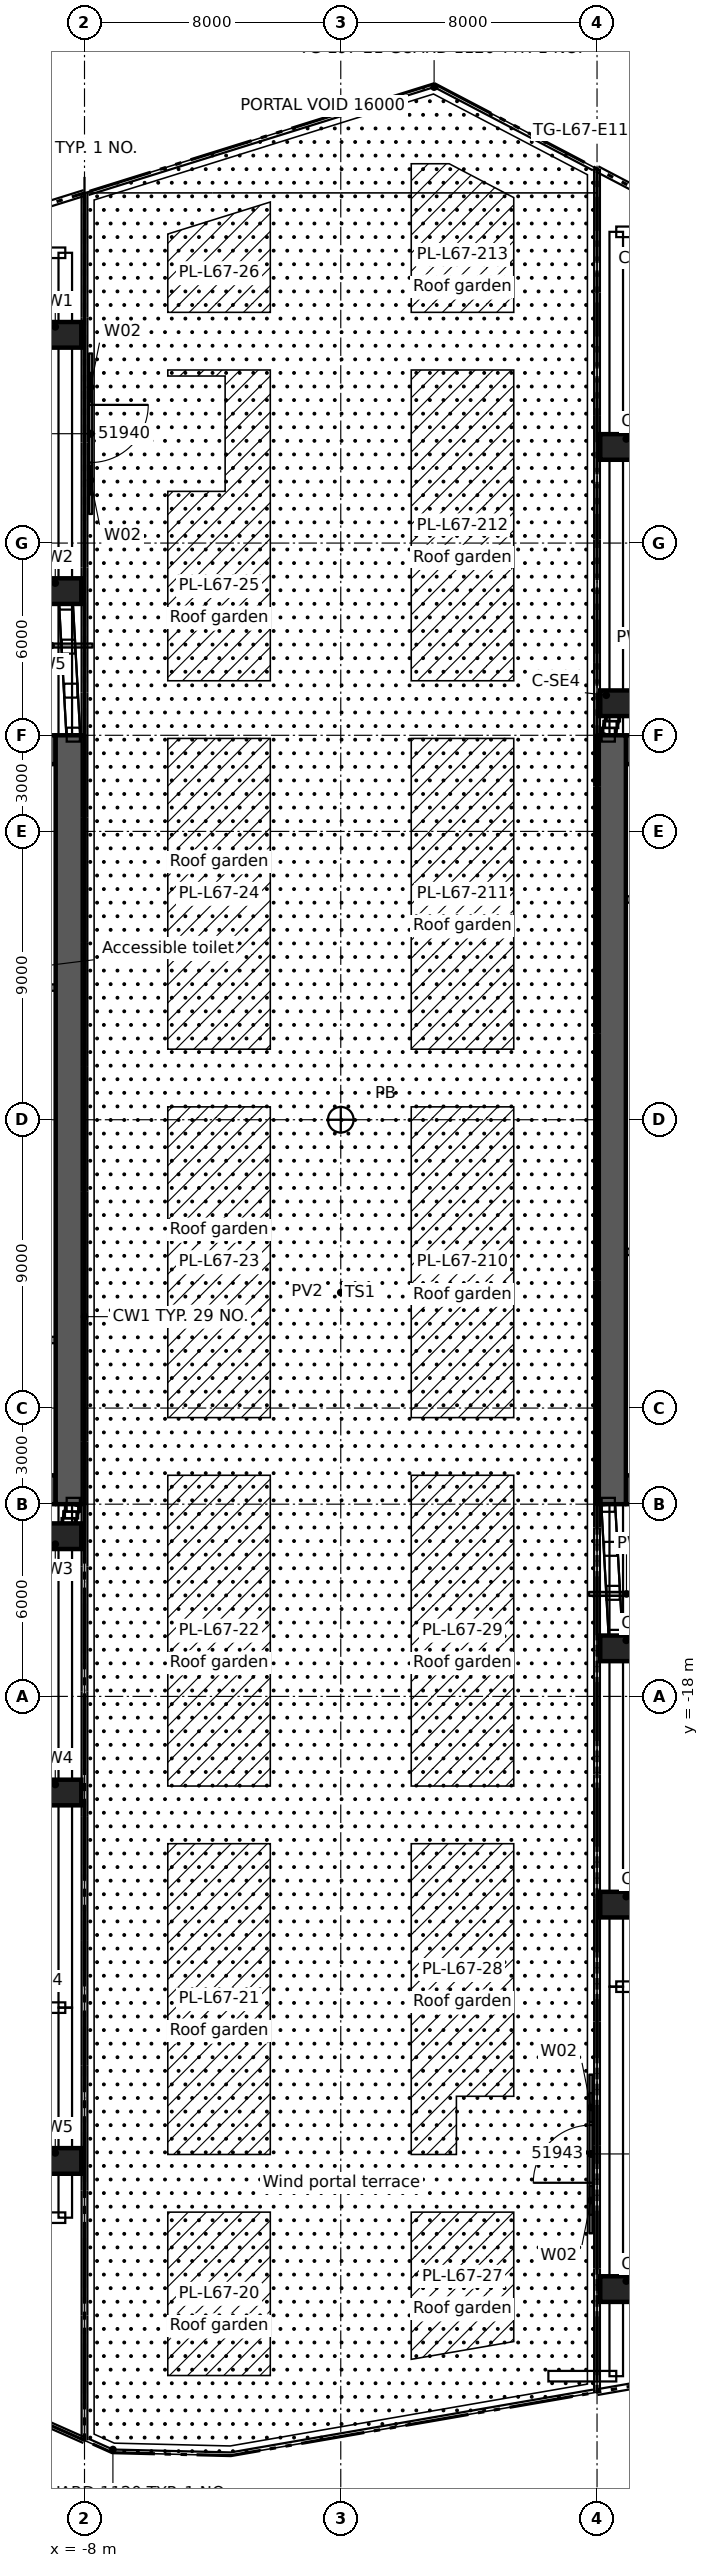
"""IFC4 building model, lengths in metres.
Left out: names, types, materials, properties, quantities, classifications, styles, units other than length and angle.
Written with IfcOpenShell. Run it as: python <this file> out.ifc"""

import sys

from ifc_helpers import new_model, si_unit, direction, frame, frame_2d, origin, origin_2d, place, context, subcontext, project, spatial, rectangle, extrude, element, fill, save


model = new_model("IFC4")
c1 = context("Model", 3, precision=1e-05, world=origin(), true_north=direction((0.0, 1.0)))
c2 = subcontext(c1, "Body", "Model", "MODEL_VIEW")
j1 = project(units=[si_unit("LENGTHUNIT", "METRE"), si_unit("PLANEANGLEUNIT", "RADIAN")], contexts=[c1])
p1 = place(None, origin())
s1 = spatial("IfcSite", under=j1, at=p1, CompositionType="ELEMENT")
p2 = place(p1, origin())
s2 = spatial("IfcBuilding", under=s1, at=p2, CompositionType="ELEMENT")
p3 = place(p2, frame((0.0, 0.0, 253.5)))
s3 = spatial("IfcBuildingStorey", under=s2, at=p3, CompositionType="ELEMENT", Elevation=253.5)
p4 = place(p3, frame((-18.1, 11.55, 0.0), z_axis=(0.0, 0.0, 1.0), x_axis=(1.0, 0.0, 0.0)))
e1 = element("IfcWall", 1, at=p4, inside=s3, PredefinedType="SHEAR", context=c2, shape_type="SweptSolid", body=[
    extrude(rectangle(XDim=9.2, YDim=0.9, at=frame_2d((4.6, 0.0))), origin(), (0.0, 0.0, 1.0), 3.5),
])
p5 = place(p4, frame((7.25, 0.0, 0.0)))
e2 = element("IfcOpeningElement", 2, at=p5, cuts=e1, PredefinedType="OPENING", context=c2, shape_type="SweptSolid", body=[
    extrude(rectangle(XDim=1.1, YDim=2.1, at=frame_2d((0.55, 1.05))), frame((0.0, 0.46, 0.0), z_axis=(0.0, -1.0, 0.0), x_axis=(1.0, 0.0, 0.0)), (0.0, 0.0, 1.0), 0.92),
])
p6 = place(p4, frame((5.1, 0.0, 0.0)))
e3 = element("IfcOpeningElement", 3, at=p6, cuts=e1, PredefinedType="OPENING", context=c2, shape_type="SweptSolid", body=[
    extrude(rectangle(XDim=1.1, YDim=2.1, at=frame_2d((0.55, 1.05))), frame((0.0, 0.46, 0.0), z_axis=(0.0, -1.0, 0.0), x_axis=(1.0, 0.0, 0.0)), (0.0, 0.0, 1.0), 0.92),
])
p7 = place(p3, frame((-18.1, -11.55, 0.0), z_axis=(0.0, 0.0, 1.0), x_axis=(1.0, 0.0, 0.0)))
e4 = element("IfcWall", 4, at=p7, inside=s3, PredefinedType="SHEAR", context=c2, shape_type="SweptSolid", body=[
    extrude(rectangle(XDim=9.2, YDim=0.9, at=frame_2d((4.6, 0.0))), origin(), (0.0, 0.0, 1.0), 3.5),
])
p8 = place(p7, frame((6.9, 0.0, 0.0)))
e5 = element("IfcOpeningElement", 5, at=p8, cuts=e4, PredefinedType="OPENING", context=c2, shape_type="SweptSolid", body=[
    extrude(rectangle(XDim=1.8, YDim=2.1, at=frame_2d((0.9, 1.05))), frame((0.0, 0.46, 0.0), z_axis=(0.0, -1.0, 0.0), x_axis=(1.0, 0.0, 0.0)), (0.0, 0.0, 1.0), 0.92),
])
p9 = place(p7, frame((5.1, 0.0, 0.0)))
e6 = element("IfcOpeningElement", 6, at=p9, cuts=e4, PredefinedType="OPENING", context=c2, shape_type="SweptSolid", body=[
    extrude(rectangle(XDim=1.1, YDim=2.1, at=frame_2d((0.55, 1.05))), frame((0.0, 0.46, 0.0), z_axis=(0.0, -1.0, 0.0), x_axis=(1.0, 0.0, 0.0)), (0.0, 0.0, 1.0), 0.92),
])
p10 = place(p3, frame((-8.45, -12.0, 0.0), z_axis=(0.0, 0.0, 1.0), x_axis=(0.0, 1.0, 0.0)))
e7 = element("IfcWall", 7, at=p10, inside=s3, PredefinedType="SHEAR", context=c2, shape_type="SweptSolid", body=[
    extrude(rectangle(XDim=24.0, YDim=0.9, at=frame_2d((12.0, 0.0))), origin(), (0.0, 0.0, 1.0), 3.5),
])
p11 = place(p3, frame((8.9, 11.55, 0.0), z_axis=(0.0, 0.0, 1.0), x_axis=(1.0, 0.0, 0.0)))
e8 = element("IfcWall", 8, at=p11, inside=s3, PredefinedType="SHEAR", context=c2, shape_type="SweptSolid", body=[
    extrude(rectangle(XDim=9.2, YDim=0.9, at=frame_2d((4.6, 0.0))), origin(), (0.0, 0.0, 1.0), 3.5),
])
p12 = place(p11, frame((0.5, 0.0, 0.0)))
e9 = element("IfcOpeningElement", 9, at=p12, cuts=e8, PredefinedType="OPENING", context=c2, shape_type="SweptSolid", body=[
    extrude(rectangle(XDim=1.8, YDim=2.1, at=frame_2d((0.9, 1.05))), frame((0.0, 0.46, 0.0), z_axis=(0.0, -1.0, 0.0), x_axis=(1.0, 0.0, 0.0)), (0.0, 0.0, 1.0), 0.92),
])
p13 = place(p11, frame((3.0, 0.0, 0.0)))
e10 = element("IfcOpeningElement", 10, at=p13, cuts=e8, PredefinedType="OPENING", context=c2, shape_type="SweptSolid", body=[
    extrude(rectangle(XDim=1.1, YDim=2.1, at=frame_2d((0.55, 1.05))), frame((0.0, 0.46, 0.0), z_axis=(0.0, -1.0, 0.0), x_axis=(1.0, 0.0, 0.0)), (0.0, 0.0, 1.0), 0.92),
])
p14 = place(p3, frame((8.9, -11.55, 0.0), z_axis=(0.0, 0.0, 1.0), x_axis=(1.0, 0.0, 0.0)))
e11 = element("IfcWall", 11, at=p14, inside=s3, PredefinedType="SHEAR", context=c2, shape_type="SweptSolid", body=[
    extrude(rectangle(XDim=9.2, YDim=0.9, at=frame_2d((4.6, 0.0))), origin(), (0.0, 0.0, 1.0), 3.5),
])
p15 = place(p14, frame((0.85, 0.0, 0.0)))
e12 = element("IfcOpeningElement", 12, at=p15, cuts=e11, PredefinedType="OPENING", context=c2, shape_type="SweptSolid", body=[
    extrude(rectangle(XDim=1.1, YDim=2.1, at=frame_2d((0.55, 1.05))), frame((0.0, 0.46, 0.0), z_axis=(0.0, -1.0, 0.0), x_axis=(1.0, 0.0, 0.0)), (0.0, 0.0, 1.0), 0.92),
])
p16 = place(p14, frame((3.0, 0.0, 0.0)))
e13 = element("IfcOpeningElement", 13, at=p16, cuts=e11, PredefinedType="OPENING", context=c2, shape_type="SweptSolid", body=[
    extrude(rectangle(XDim=1.1, YDim=2.1, at=frame_2d((0.55, 1.05))), frame((0.0, 0.46, 0.0), z_axis=(0.0, -1.0, 0.0), x_axis=(1.0, 0.0, 0.0)), (0.0, 0.0, 1.0), 0.92),
])
p17 = place(p3, frame((8.45, -12.0, 0.0), z_axis=(0.0, 0.0, 1.0), x_axis=(0.0, 1.0, 0.0)))
e14 = element("IfcWall", 14, at=p17, inside=s3, PredefinedType="SHEAR", context=c2, shape_type="SweptSolid", body=[
    extrude(rectangle(XDim=24.0, YDim=0.9, at=frame_2d((12.0, 0.0))), origin(), (0.0, 0.0, 1.0), 3.5),
])
for number, where, z_axis, x_axis in (
    (15, (8.6, -36.5, 0.0), (0.0, 0.0, 1.0), (1.0, 0.0, 0.0)),
    (16, (8.6, -24.5, 0.0), (0.0, 0.0, 1.0), (1.0, 0.0, 0.0)),
    (17, (8.6, -16.5, 0.0), (0.0, 0.0, 1.0), (1.0, 0.0, 0.0)),
    (18, (8.6, 13.0, 0.0), (0.0, 0.0, 1.0), (1.0, 0.0, 0.0)),
    (19, (8.6, 21.0, 0.0), (0.0, 0.0, 1.0), (1.0, 0.0, 0.0)),
    (20, (-8.6, 24.5, 0.0), (0.0, 0.0, 1.0), (1.0, 0.0, 0.0)),
    (21, (-8.6, 16.5, 0.0), (0.0, 0.0, 1.0), (1.0, 0.0, 0.0)),
    (22, (-8.6, -13.0, 0.0), (0.0, 0.0, 1.0), (1.0, 0.0, 0.0)),
    (23, (-8.6, -21.0, 0.0), (0.0, 0.0, 1.0), (1.0, 0.0, 0.0)),
    (24, (-8.6, -32.5, 0.0), (0.0, 0.0, 1.0), (1.0, 0.0, 0.0)),
):
    element("IfcColumn", number, at=place(p3, frame(where, z_axis=z_axis, x_axis=x_axis)), inside=s3, PredefinedType="COLUMN", context=c2, shape_type="SweptSolid", body=[
        extrude(rectangle(XDim=1.0, YDim=0.8, at=origin_2d()), origin(), (0.0, 0.0, 1.0), 3.5),
    ])
p18 = place(p2, frame((0.0, 0.0, 271.0)))
s4 = spatial("IfcBuildingStorey", under=s2, at=p18, CompositionType="ELEMENT", Elevation=271.0)
for number, where, z_axis, x_axis in (
    (25, (-8.6, 30.43, -21.5), (0.0, 0.0, 1.0), (1.0, 0.0, 0.0)),
    (26, (8.6, 31.179, -21.5), (0.0, 0.0, 1.0), (1.0, 0.0, 0.0)),
    (27, (-8.6, -42.723, -21.5), (0.0, 0.0, 1.0), (1.0, 0.0, 0.0)),
    (28, (8.6, -41.217, -21.5), (0.0, 0.0, 1.0), (1.0, 0.0, 0.0)),
):
    element("IfcColumn", number, at=place(p18, frame(where, z_axis=z_axis, x_axis=x_axis)), inside=s4, PredefinedType="COLUMN", context=c2, shape_type="SweptSolid", body=[
        extrude(rectangle(XDim=1.2, YDim=1.2, at=origin_2d()), origin(), (0.0, 0.0, 1.0), 25.5),
    ])
p19 = place(p3, frame((-8.9, 4.125, 0.0), z_axis=(0.0, 0.0, 1.0), x_axis=(-1.0, 0.0, 0.0)))
e29 = element("IfcWall", 29, at=p19, inside=s3, PredefinedType="PARTITIONING", context=c2, shape_type="SweptSolid", body=[
    extrude(rectangle(XDim=2.44, YDim=0.2, at=frame_2d((1.22, 0.0))), origin(), (0.0, 0.0, 1.0), 3.09),
])
p20 = place(p19, frame((0.67, 0.0, 0.0)))
e30 = element("IfcOpeningElement", 30, at=p20, cuts=e29, PredefinedType="OPENING", context=c2, shape_type="SweptSolid", body=[
    extrude(rectangle(XDim=1.1, YDim=2.1, at=frame_2d((0.55, 1.05))), frame((0.0, 0.11, 0.0), z_axis=(0.0, -1.0, 0.0), x_axis=(1.0, 0.0, 0.0)), (0.0, 0.0, 1.0), 0.22),
])
p21 = place(p3, frame((-8.9, -6.875, 0.0), z_axis=(0.0, 0.0, 1.0), x_axis=(-1.0, 0.0, 0.0)))
e31 = element("IfcWall", 31, at=p21, inside=s3, PredefinedType="PARTITIONING", context=c2, shape_type="SweptSolid", body=[
    extrude(rectangle(XDim=2.44, YDim=0.2, at=frame_2d((1.22, 0.0))), origin(), (0.0, 0.0, 1.0), 3.09),
])
p22 = place(p21, frame((0.35, 0.0, 0.0)))
e32 = element("IfcOpeningElement", 32, at=p22, cuts=e31, PredefinedType="OPENING", context=c2, shape_type="SweptSolid", body=[
    extrude(rectangle(XDim=1.8, YDim=2.1, at=frame_2d((0.9, 1.05))), frame((0.0, 0.11, 0.0), z_axis=(0.0, -1.0, 0.0), x_axis=(1.0, 0.0, 0.0)), (0.0, 0.0, 1.0), 0.22),
])
p23 = place(p3, frame((8.9, -4.125, 0.0), z_axis=(0.0, 0.0, 1.0), x_axis=(1.0, 0.0, 0.0)))
e33 = element("IfcWall", 33, at=p23, inside=s3, PredefinedType="PARTITIONING", context=c2, shape_type="SweptSolid", body=[
    extrude(rectangle(XDim=2.44, YDim=0.2, at=frame_2d((1.22, 0.0))), origin(), (0.0, 0.0, 1.0), 3.09),
])
p24 = place(p23, frame((0.67, 0.0, 0.0)))
e34 = element("IfcOpeningElement", 34, at=p24, cuts=e33, PredefinedType="OPENING", context=c2, shape_type="SweptSolid", body=[
    extrude(rectangle(XDim=1.1, YDim=2.1, at=frame_2d((0.55, 1.05))), frame((0.0, 0.11, 0.0), z_axis=(0.0, -1.0, 0.0), x_axis=(1.0, 0.0, 0.0)), (0.0, 0.0, 1.0), 0.22),
])
p25 = place(p3, frame((8.9, 6.875, 0.0), z_axis=(0.0, 0.0, 1.0), x_axis=(1.0, 0.0, 0.0)))
e35 = element("IfcWall", 35, at=p25, inside=s3, PredefinedType="PARTITIONING", context=c2, shape_type="SweptSolid", body=[
    extrude(rectangle(XDim=2.44, YDim=0.2, at=frame_2d((1.22, 0.0))), origin(), (0.0, 0.0, 1.0), 3.09),
])
p26 = place(p25, frame((0.35, 0.0, 0.0)))
e36 = element("IfcOpeningElement", 36, at=p26, cuts=e35, PredefinedType="OPENING", context=c2, shape_type="SweptSolid", body=[
    extrude(rectangle(XDim=1.8, YDim=2.1, at=frame_2d((0.9, 1.05))), frame((0.0, 0.11, 0.0), z_axis=(0.0, -1.0, 0.0), x_axis=(1.0, 0.0, 0.0)), (0.0, 0.0, 1.0), 0.22),
])
p27 = place(p3, frame((-7.81, 23.919, 0.0), z_axis=(0.0, 0.0, 1.0), x_axis=(0.0, -1.0, 0.0)))
e37 = element("IfcWall", 37, at=p27, inside=s3, PredefinedType="STANDARD", context=c2, shape_type="SweptSolid", body=[
    extrude(rectangle(XDim=5.011, YDim=0.1, at=frame_2d((2.505, 0.0))), origin(), (0.0, 0.0, 1.0), 3.1),
])
p28 = place(p27, frame((1.605, 0.0, 0.0)))
e38 = element("IfcOpeningElement", 38, at=p28, cuts=e37, PredefinedType="OPENING", context=c2, shape_type="SweptSolid", body=[
    extrude(rectangle(XDim=1.8, YDim=2.4, at=frame_2d((0.9, 1.2))), frame((0.0, 0.06, 0.0), z_axis=(0.0, -1.0, 0.0), x_axis=(1.0, 0.0, 0.0)), (0.0, 0.0, 1.0), 0.12),
])
p29 = place(p27, frame((0.605, 0.0, 0.0)))
e39 = element("IfcOpeningElement", 39, at=p29, cuts=e37, PredefinedType="OPENING", context=c2, shape_type="SweptSolid", body=[
    extrude(rectangle(XDim=0.9, YDim=2.4, at=frame_2d((0.45, 1.2))), frame((0.0, 0.06, 0.0), z_axis=(0.0, -1.0, 0.0), x_axis=(1.0, 0.0, 0.0)), (0.0, 0.0, 1.0), 0.12),
])
p30 = place(p27, frame((3.505, 0.0, 0.0)))
e40 = element("IfcOpeningElement", 40, at=p30, cuts=e37, PredefinedType="OPENING", context=c2, shape_type="SweptSolid", body=[
    extrude(rectangle(XDim=0.9, YDim=2.4, at=frame_2d((0.45, 1.2))), frame((0.0, 0.06, 0.0), z_axis=(0.0, -1.0, 0.0), x_axis=(1.0, 0.0, 0.0)), (0.0, 0.0, 1.0), 0.12),
])
p31 = place(p3, frame((7.81, -34.76, 0.0), z_axis=(0.0, 0.0, 1.0), x_axis=(0.0, 1.0, 0.0)))
e41 = element("IfcWall", 41, at=p31, inside=s3, PredefinedType="STANDARD", context=c2, shape_type="SweptSolid", body=[
    extrude(rectangle(XDim=4.957, YDim=0.1, at=frame_2d((2.479, 0.0))), origin(), (0.0, 0.0, 1.0), 3.1),
])
p32 = place(p31, frame((1.578, 0.0, 0.0)))
e42 = element("IfcOpeningElement", 42, at=p32, cuts=e41, PredefinedType="OPENING", context=c2, shape_type="SweptSolid", body=[
    extrude(rectangle(XDim=1.8, YDim=2.4, at=frame_2d((0.9, 1.2))), frame((0.0, 0.06, 0.0), z_axis=(0.0, -1.0, 0.0), x_axis=(1.0, 0.0, 0.0)), (0.0, 0.0, 1.0), 0.12),
])
p33 = place(p31, frame((0.578, 0.0, 0.0)))
e43 = element("IfcOpeningElement", 43, at=p33, cuts=e41, PredefinedType="OPENING", context=c2, shape_type="SweptSolid", body=[
    extrude(rectangle(XDim=0.9, YDim=2.4, at=frame_2d((0.45, 1.2))), frame((0.0, 0.06, 0.0), z_axis=(0.0, -1.0, 0.0), x_axis=(1.0, 0.0, 0.0)), (0.0, 0.0, 1.0), 0.12),
])
p34 = place(p31, frame((3.479, 0.0, 0.0)))
e44 = element("IfcOpeningElement", 44, at=p34, cuts=e41, PredefinedType="OPENING", context=c2, shape_type="SweptSolid", body=[
    extrude(rectangle(XDim=0.9, YDim=2.4, at=frame_2d((0.45, 1.2))), frame((0.0, 0.06, 0.0), z_axis=(0.0, -1.0, 0.0), x_axis=(1.0, 0.0, 0.0)), (0.0, 0.0, 1.0), 0.12),
])
p35 = place(p3, frame((7.75, -14.801, 0.0), z_axis=(0.0, 0.0, 1.0), x_axis=(1.0, 0.0, 0.0)))
e45 = element("IfcWall", 45, at=p35, inside=s3, PredefinedType="PARTITIONING", context=c2, shape_type="SweptSolid", body=[
    extrude(rectangle(XDim=2.338, YDim=0.125, at=frame_2d((1.169, 0.0))), origin(), (0.0, 0.0, 1.0), 2.496),
])
p36 = place(p3, frame((-10.336, 14.801, 0.0), z_axis=(0.0, 0.0, 1.0), x_axis=(1.0, 0.0, 0.0)))
e46 = element("IfcWall", 46, at=p36, inside=s3, PredefinedType="PARTITIONING", context=c2, shape_type="SweptSolid", body=[
    extrude(rectangle(XDim=2.586, YDim=0.125, at=frame_2d((1.293, 0.0))), origin(), (0.0, 0.0, 1.0), 2.496),
])
p37 = place(p28, origin())
e47 = element("IfcDoor", 47, at=p37, inside=s3, OperationType="DOUBLE_DOOR_SINGLE_SWING", PredefinedType="DOOR", context=c2, shape_type="SweptSolid", body=[
    extrude(rectangle(XDim=1.8, YDim=2.4, at=frame_2d((0.9, 1.2))), frame((0.0, 0.025, 0.0), z_axis=(0.0, -1.0, 0.0), x_axis=(1.0, 0.0, 0.0)), (0.0, 0.0, 1.0), 0.05),
])
fill(e38, e47)
p38 = place(p29, origin())
e48 = element("IfcWindow", 48, at=p38, inside=s3, PartitioningType="SINGLE_PANEL", PredefinedType="WINDOW", context=c2, shape_type="SweptSolid", body=[
    extrude(rectangle(XDim=0.9, YDim=2.4, at=frame_2d((0.45, 1.2))), frame((0.0, 0.03, 0.0), z_axis=(0.0, -1.0, 0.0), x_axis=(1.0, 0.0, 0.0)), (0.0, 0.0, 1.0), 0.06),
])
fill(e39, e48)
p39 = place(p30, origin())
e49 = element("IfcWindow", 49, at=p39, inside=s3, PartitioningType="SINGLE_PANEL", PredefinedType="WINDOW", context=c2, shape_type="SweptSolid", body=[
    extrude(rectangle(XDim=0.9, YDim=2.4, at=frame_2d((0.45, 1.2))), frame((0.0, 0.03, 0.0), z_axis=(0.0, -1.0, 0.0), x_axis=(1.0, 0.0, 0.0)), (0.0, 0.0, 1.0), 0.06),
])
fill(e40, e49)
p40 = place(p32, origin())
e50 = element("IfcDoor", 50, at=p40, inside=s3, OperationType="DOUBLE_DOOR_SINGLE_SWING", PredefinedType="DOOR", context=c2, shape_type="SweptSolid", body=[
    extrude(rectangle(XDim=1.8, YDim=2.4, at=frame_2d((0.9, 1.2))), frame((0.0, 0.025, 0.0), z_axis=(0.0, -1.0, 0.0), x_axis=(1.0, 0.0, 0.0)), (0.0, 0.0, 1.0), 0.05),
])
fill(e42, e50)
p41 = place(p33, origin())
e51 = element("IfcWindow", 51, at=p41, inside=s3, PartitioningType="SINGLE_PANEL", PredefinedType="WINDOW", context=c2, shape_type="SweptSolid", body=[
    extrude(rectangle(XDim=0.9, YDim=2.4, at=frame_2d((0.45, 1.2))), frame((0.0, 0.03, 0.0), z_axis=(0.0, -1.0, 0.0), x_axis=(1.0, 0.0, 0.0)), (0.0, 0.0, 1.0), 0.06),
])
fill(e43, e51)
p42 = place(p34, origin())
e52 = element("IfcWindow", 52, at=p42, inside=s3, PartitioningType="SINGLE_PANEL", PredefinedType="WINDOW", context=c2, shape_type="SweptSolid", body=[
    extrude(rectangle(XDim=0.9, YDim=2.4, at=frame_2d((0.45, 1.2))), frame((0.0, 0.03, 0.0), z_axis=(0.0, -1.0, 0.0), x_axis=(1.0, 0.0, 0.0)), (0.0, 0.0, 1.0), 0.06),
])
fill(e44, e52)
save(model, sys.argv[1])
